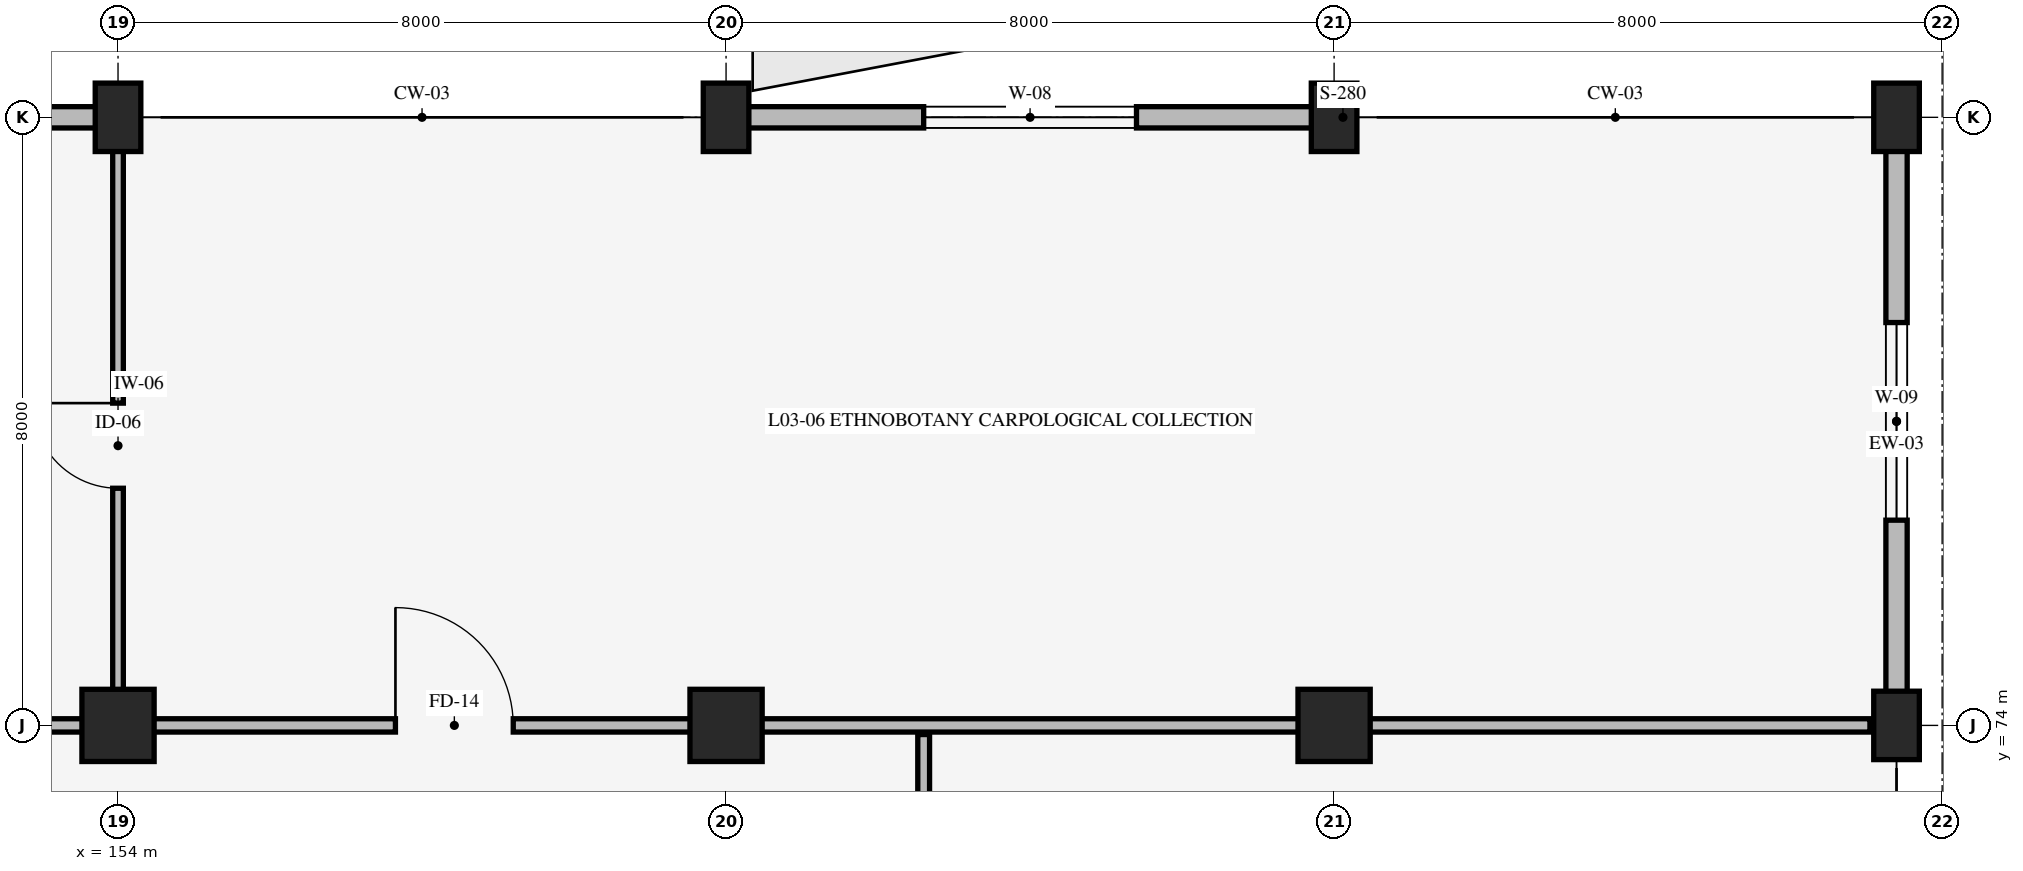
"""IFC4 building model, lengths in metres.
Left out: names, types, materials, properties, quantities, classifications, styles, units other than length and angle.
Written with IfcOpenShell. Run it as: python <this file> out.ifc"""

import sys

from ifc_helpers import new_model, si_unit, direction, frame, frame_2d, origin, origin_2d, place, context, subcontext, project, spatial, rectangle, extrude, element, fill, save


model = new_model("IFC4")
c1 = context("Model", 3, precision=1e-05, world=origin(), true_north=direction((0.0, 1.0)))
c2 = subcontext(c1, "Body", "Model", "MODEL_VIEW")
j1 = project(units=[si_unit("LENGTHUNIT", "METRE"), si_unit("PLANEANGLEUNIT", "RADIAN")], contexts=[c1])
p1 = place(None, origin())
s1 = spatial("IfcSite", under=j1, at=p1, CompositionType="ELEMENT")
p2 = place(p1, origin())
s2 = spatial("IfcBuilding", under=s1, at=p2, CompositionType="ELEMENT")
p3 = place(p2, frame((0.0, 0.0, 10.2)))
s3 = spatial("IfcBuildingStorey", under=s2, at=p3, CompositionType="ELEMENT", Elevation=10.2)
p4 = place(p3, frame((154.0, 74.0, 0.0), z_axis=(0.0, 0.0, 1.0), x_axis=(1.0, 0.0, 0.0)))
e1 = element("IfcColumn", 1, at=p4, inside=s3, PredefinedType="COLUMN", context=c2, shape_type="SweptSolid", body=[
    extrude(rectangle(XDim=0.95, YDim=0.95, at=origin_2d()), origin(), (0.0, 0.0, 1.0), 4.8),
])
p5 = place(p3, frame((154.0, 82.0, 0.0), z_axis=(0.0, 0.0, 1.0), x_axis=(1.0, 0.0, 0.0)))
e2 = element("IfcColumn", 2, at=p5, inside=s3, PredefinedType="COLUMN", context=c2, shape_type="SweptSolid", body=[
    extrude(rectangle(XDim=0.6, YDim=0.9, at=origin_2d()), origin(), (0.0, 0.0, 1.0), 4.8),
])
p6 = place(p3, frame((162.0, 74.0, 0.0), z_axis=(0.0, 0.0, 1.0), x_axis=(1.0, 0.0, 0.0)))
e3 = element("IfcColumn", 3, at=p6, inside=s3, PredefinedType="COLUMN", context=c2, shape_type="SweptSolid", body=[
    extrude(rectangle(XDim=0.95, YDim=0.95, at=origin_2d()), origin(), (0.0, 0.0, 1.0), 4.8),
])
p7 = place(p3, frame((162.0, 82.0, 0.0), z_axis=(0.0, 0.0, 1.0), x_axis=(1.0, 0.0, 0.0)))
e4 = element("IfcColumn", 4, at=p7, inside=s3, PredefinedType="COLUMN", context=c2, shape_type="SweptSolid", body=[
    extrude(rectangle(XDim=0.6, YDim=0.9, at=origin_2d()), origin(), (0.0, 0.0, 1.0), 4.8),
])
p8 = place(p3, frame((170.0, 74.0, 0.0), z_axis=(0.0, 0.0, 1.0), x_axis=(1.0, 0.0, 0.0)))
e5 = element("IfcColumn", 5, at=p8, inside=s3, PredefinedType="COLUMN", context=c2, shape_type="SweptSolid", body=[
    extrude(rectangle(XDim=0.95, YDim=0.95, at=origin_2d()), origin(), (0.0, 0.0, 1.0), 4.8),
])
for number, where, z_axis, x_axis in (
    (6, (170.0, 82.0, 0.0), (0.0, 0.0, 1.0), (1.0, 0.0, 0.0)),
    (7, (177.4, 74.0, 0.0), (0.0, 0.0, 1.0), (1.0, 0.0, 0.0)),
    (8, (177.4, 82.0, 0.0), (0.0, 0.0, 1.0), (1.0, 0.0, 0.0)),
):
    element("IfcColumn", number, at=place(p3, frame(where, z_axis=z_axis, x_axis=x_axis)), inside=s3, PredefinedType="COLUMN", context=c2, shape_type="SweptSolid", body=[
        extrude(rectangle(XDim=0.6, YDim=0.9, at=origin_2d()), origin(), (0.0, 0.0, 1.0), 4.8),
    ])
p9 = place(p3, frame((146.0, 82.0, 0.0), z_axis=(0.0, 0.0, 1.0), x_axis=(1.0, 0.0, 0.0)))
e9 = element("IfcWall", 9, at=p9, inside=s3, PredefinedType="STANDARD", context=c2, shape_type="SweptSolid", body=[
    extrude(rectangle(XDim=8.0, YDim=0.28, at=frame_2d((4.0, 0.0))), origin(), (0.0, 0.0, 1.0), 3.63),
])
p10 = place(p9, frame((2.5, 0.0, 0.85)))
e10 = element("IfcOpeningElement", 10, at=p10, cuts=e9, PredefinedType="OPENING", context=c2, shape_type="SweptSolid", body=[
    extrude(rectangle(XDim=3.0, YDim=1.8, at=frame_2d((1.5, 0.9))), frame((0.0, 0.15, 0.0), z_axis=(0.0, -1.0, 0.0), x_axis=(1.0, 0.0, 0.0)), (0.0, 0.0, 1.0), 0.3),
])
p11 = place(p3, frame((162.0, 82.0, 0.0), z_axis=(0.0, 0.0, 1.0), x_axis=(1.0, 0.0, 0.0)))
e11 = element("IfcWall", 11, at=p11, inside=s3, PredefinedType="STANDARD", context=c2, shape_type="SweptSolid", body=[
    extrude(rectangle(XDim=8.0, YDim=0.28, at=frame_2d((4.0, 0.0))), origin(), (0.0, 0.0, 1.0), 3.63),
])
p12 = place(p11, frame((2.6, 0.0, 0.85)))
e12 = element("IfcOpeningElement", 12, at=p12, cuts=e11, PredefinedType="OPENING", context=c2, shape_type="SweptSolid", body=[
    extrude(rectangle(XDim=2.8, YDim=1.6, at=frame_2d((1.4, 0.8))), frame((0.0, 0.15, 0.0), z_axis=(0.0, -1.0, 0.0), x_axis=(1.0, 0.0, 0.0)), (0.0, 0.0, 1.0), 0.3),
])
p13 = place(p3, frame((177.4, 82.0, 0.0), z_axis=(0.0, 0.0, 1.0), x_axis=(0.0, -1.0, 0.0)))
e13 = element("IfcWall", 13, at=p13, inside=s3, PredefinedType="STANDARD", context=c2, shape_type="SweptSolid", body=[
    extrude(rectangle(XDim=8.0, YDim=0.28, at=frame_2d((4.0, 0.0))), origin(), (0.0, 0.0, 1.0), 3.68),
])
p14 = place(p13, frame((2.7, 0.0, 0.85)))
e14 = element("IfcOpeningElement", 14, at=p14, cuts=e13, PredefinedType="OPENING", context=c2, shape_type="SweptSolid", body=[
    extrude(rectangle(XDim=2.6, YDim=1.5, at=frame_2d((1.3, 0.75))), frame((0.0, 0.15, 0.0), z_axis=(0.0, -1.0, 0.0), x_axis=(1.0, 0.0, 0.0)), (0.0, 0.0, 1.0), 0.3),
])
p15 = place(p3, frame((164.6, 58.08, 0.0), z_axis=(0.0, 0.0, 1.0), x_axis=(0.0, 1.0, 0.0)))
e15 = element("IfcWall", 15, at=p15, inside=s3, PredefinedType="STANDARD", context=c2, shape_type="SweptSolid", body=[
    extrude(rectangle(XDim=15.8, YDim=0.155, at=frame_2d((7.9, 0.0))), origin(), (0.0, 0.0, 1.0), 4.5),
])
p16 = place(p15, frame((7.25, 0.0, 0.0)))
e16 = element("IfcOpeningElement", 16, at=p16, cuts=e15, PredefinedType="OPENING", context=c2, shape_type="SweptSolid", body=[
    extrude(rectangle(XDim=1.3, YDim=2.15, at=frame_2d((0.65, 1.075))), frame((0.0, 0.087, 0.0), z_axis=(0.0, -1.0, 0.0), x_axis=(1.0, 0.0, 0.0)), (0.0, 0.0, 1.0), 0.175),
])
p17 = place(p3, frame((130.35, 74.0, 0.0), z_axis=(0.0, 0.0, 1.0), x_axis=(1.0, 0.0, 0.0)))
e17 = element("IfcWall", 17, at=p17, inside=s3, PredefinedType="STANDARD", context=c2, shape_type="SweptSolid", body=[
    extrude(rectangle(XDim=23.3, YDim=0.175, at=frame_2d((11.65, 0.0))), origin(), (0.0, 0.0, 1.0), 3.63),
])
p18 = place(p17, frame((3.3, 0.0, 0.0)))
e18 = element("IfcOpeningElement", 18, at=p18, cuts=e17, PredefinedType="OPENING", context=c2, shape_type="SweptSolid", body=[
    extrude(rectangle(XDim=1.5, YDim=2.2, at=frame_2d((0.75, 1.1))), frame((0.0, 0.098, 0.0), z_axis=(0.0, -1.0, 0.0), x_axis=(1.0, 0.0, 0.0)), (0.0, 0.0, 1.0), 0.195),
])
p19 = place(p3, frame((154.0, 74.12, 0.0), z_axis=(0.0, 0.0, 1.0), x_axis=(0.0, 1.0, 0.0)))
e19 = element("IfcWall", 19, at=p19, inside=s3, PredefinedType="STANDARD", context=c2, shape_type="SweptSolid", body=[
    extrude(rectangle(XDim=7.83, YDim=0.14, at=frame_2d((3.915, 0.0))), origin(), (0.0, 0.0, 1.0), 3.68),
])
p20 = place(p19, frame((3.0, 0.0, 0.0)))
e20 = element("IfcOpeningElement", 20, at=p20, cuts=e19, PredefinedType="OPENING", context=c2, shape_type="SweptSolid", body=[
    extrude(rectangle(XDim=1.12, YDim=2.12, at=frame_2d((0.56, 1.06))), frame((0.0, 0.08, 0.0), z_axis=(0.0, -1.0, 0.0), x_axis=(1.0, 0.0, 0.0)), (0.0, 0.0, 1.0), 0.16),
])
p21 = place(p3, frame((154.35, 74.0, 0.0), z_axis=(0.0, 0.0, 1.0), x_axis=(1.0, 0.0, 0.0)))
e21 = element("IfcWall", 21, at=p21, inside=s3, PredefinedType="STANDARD", context=c2, shape_type="SweptSolid", body=[
    extrude(rectangle(XDim=22.7, YDim=0.175, at=frame_2d((11.35, 0.0))), origin(), (0.0, 0.0, 1.0), 3.63),
])
p22 = place(p21, frame((3.3, 0.0, 0.0)))
e22 = element("IfcOpeningElement", 22, at=p22, cuts=e21, PredefinedType="OPENING", context=c2, shape_type="SweptSolid", body=[
    extrude(rectangle(XDim=1.55, YDim=2.25, at=frame_2d((0.775, 1.125))), frame((0.0, 0.098, 0.0), z_axis=(0.0, -1.0, 0.0), x_axis=(1.0, 0.0, 0.0)), (0.0, 0.0, 1.0), 0.195),
])
p23 = place(p12, origin())
e23 = element("IfcWindow", 23, at=p23, inside=s3, PartitioningType="SINGLE_PANEL", PredefinedType="WINDOW", context=c2, shape_type="SweptSolid", body=[
    extrude(rectangle(XDim=2.8, YDim=1.6, at=frame_2d((1.4, 0.8))), frame((0.0, 0.03, 0.0), z_axis=(0.0, -1.0, 0.0), x_axis=(1.0, 0.0, 0.0)), (0.0, 0.0, 1.0), 0.06),
])
fill(e12, e23)
p24 = place(p14, origin())
e24 = element("IfcWindow", 24, at=p24, inside=s3, PartitioningType="SINGLE_PANEL", PredefinedType="WINDOW", context=c2, shape_type="SweptSolid", body=[
    extrude(rectangle(XDim=2.6, YDim=1.5, at=frame_2d((1.3, 0.75))), frame((0.0, 0.03, 0.0), z_axis=(0.0, -1.0, 0.0), x_axis=(1.0, 0.0, 0.0)), (0.0, 0.0, 1.0), 0.06),
])
fill(e14, e24)
p25 = place(p20, origin())
e25 = element("IfcDoor", 25, at=p25, inside=s3, OperationType="SINGLE_SWING_RIGHT", PredefinedType="DOOR", context=c2, shape_type="SweptSolid", body=[
    extrude(rectangle(XDim=1.12, YDim=2.12, at=frame_2d((0.56, 1.06))), frame((0.0, 0.025, 0.0), z_axis=(0.0, -1.0, 0.0), x_axis=(1.0, 0.0, 0.0)), (0.0, 0.0, 1.0), 0.05),
])
fill(e20, e25)
p26 = place(p22, origin())
e26 = element("IfcDoor", 26, at=p26, inside=s3, OperationType="SINGLE_SWING_LEFT", PredefinedType="DOOR", context=c2, shape_type="SweptSolid", body=[
    extrude(rectangle(XDim=1.55, YDim=2.25, at=frame_2d((0.775, 1.125))), frame((0.0, 0.025, 0.0), z_axis=(0.0, -1.0, 0.0), x_axis=(1.0, 0.0, 0.0)), (0.0, 0.0, 1.0), 0.05),
])
fill(e22, e26)
save(model, sys.argv[1])
